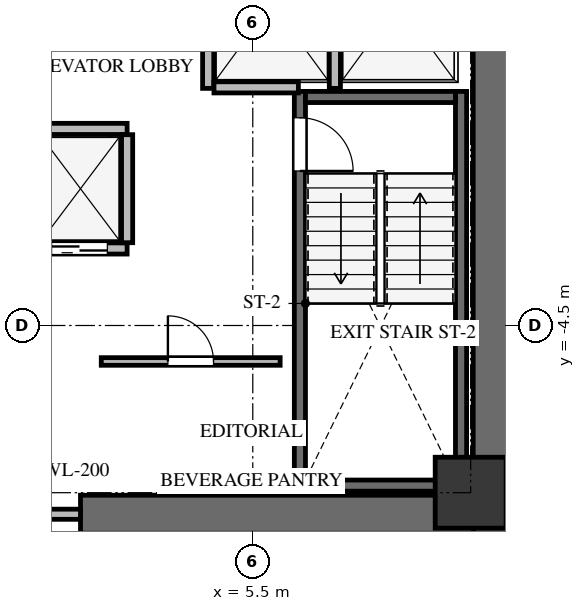
"""IFC4 building model, lengths in metres.
Left out: names, types, materials, properties, quantities, classifications, styles, units other than length and angle.
Written with IfcOpenShell. Run it as: python <this file> out.ifc"""

import sys

from ifc_helpers import new_model, si_unit, direction, frame, frame_2d, origin, origin_2d, place, context, subcontext, project, spatial, rectangle, extrude, source, transform, mapped, element, fill, save


model = new_model("IFC4")
c1 = context("Model", 3, precision=1e-05, world=origin(), true_north=direction((0.0, 1.0)))
c2 = subcontext(c1, "Body", "Model", "MODEL_VIEW")
j1 = project(units=[si_unit("LENGTHUNIT", "METRE"), si_unit("PLANEANGLEUNIT", "RADIAN")], contexts=[c1])
p1 = place(None, origin())
s1 = spatial("IfcSite", under=j1, at=p1, CompositionType="ELEMENT")
p2 = place(p1, origin())
s2 = spatial("IfcBuilding", under=s1, at=p2, CompositionType="ELEMENT")
p3 = place(p2, frame((0.0, 0.0, 117.3)))
s3 = spatial("IfcBuildingStorey", under=s2, at=p3, CompositionType="ELEMENT", Elevation=117.3)
p4 = place(p3, frame((10.225, -8.6, 0.0), z_axis=(0.0, 0.0, 1.0), x_axis=(0.0, 1.0, 0.0)))
e1 = element("IfcWall", 1, at=p4, inside=s3, PredefinedType="SHEAR", context=c2, shape_type="SweptSolid", body=[
    extrude(rectangle(XDim=17.2, YDim=0.75, at=frame_2d((8.6, 0.0))), origin(), (0.0, 0.0, 1.0), 3.3),
])
p5 = place(p3, frame((2.1, -8.225, 0.0), z_axis=(0.0, 0.0, 1.0), x_axis=(1.0, 0.0, 0.0)))
e2 = element("IfcWall", 2, at=p5, inside=s3, PredefinedType="SHEAR", context=c2, shape_type="SweptSolid", body=[
    extrude(rectangle(XDim=7.75, YDim=0.75, at=frame_2d((3.875, 0.0))), origin(), (0.0, 0.0, 1.0), 3.3),
])
p6 = place(p3, frame((9.61, -7.77, -0.24), z_axis=(0.0, 0.0, 1.0), x_axis=(0.0, 1.0, 0.0)))
e3 = element("IfcWall", 3, at=p6, inside=s3, PredefinedType="SHEAR", context=c2, shape_type="SweptSolid", body=[
    extrude(rectangle(XDim=7.89, YDim=0.22, at=frame_2d((3.945, 0.0))), origin(), (0.0, 0.0, 1.0), 3.3),
])
p7 = place(p3, frame((6.43, 0.12, -0.24), z_axis=(0.0, 0.0, 1.0), x_axis=(0.0, -1.0, 0.0)))
e4 = element("IfcWall", 4, at=p7, inside=s3, PredefinedType="SHEAR", context=c2, shape_type="SweptSolid", body=[
    extrude(rectangle(XDim=7.89, YDim=0.22, at=frame_2d((3.945, 0.0))), origin(), (0.0, 0.0, 1.0), 3.3),
])
p8 = place(p7, frame((0.52, 0.0, 0.0)))
e5 = element("IfcOpeningElement", 5, at=p8, cuts=e4, PredefinedType="OPENING", context=c2, shape_type="SweptSolid", body=[
    extrude(rectangle(XDim=1.05, YDim=2.15, at=frame_2d((0.525, 1.075))), frame((0.0, 0.12, 0.0), z_axis=(0.0, -1.0, 0.0), x_axis=(1.0, 0.0, 0.0)), (0.0, 0.0, 1.0), 0.24),
])
for number, where, z_axis, x_axis in (
    (6, (6.54, -7.66, -0.24), (0.0, 0.0, 1.0), (1.0, 0.0, 0.0)),
    (7, (9.5, 0.01, -0.24), (0.0, 0.0, 1.0), (-1.0, 0.0, 0.0)),
):
    element("IfcWall", number, at=place(p3, frame(where, z_axis=z_axis, x_axis=x_axis)), inside=s3, PredefinedType="SHEAR", context=c2, shape_type="SweptSolid", body=[
        extrude(rectangle(XDim=2.96, YDim=0.22, at=frame_2d((1.48, 0.0))), origin(), (0.0, 0.0, 1.0), 3.3),
    ])
m1 = source(origin(), c2, "Body", "SweptSolid", [
    extrude(rectangle(XDim=1.4, YDim=1.4, at=origin_2d()), origin(), (0.0, 0.0, 1.0), 3.3),
])
p9 = place(p3, frame((9.8, -7.8, -0.24), z_axis=(0.0, 0.0, 1.0), x_axis=(1.0, 0.0, 0.0)))
e8 = element("IfcColumn", 8, at=p9, inside=s3, PredefinedType="COLUMN", context=c2, shape_type="MappedRepresentation", body=[
    mapped(m1, transform((0.0, 0.0, 0.0), x_axis=(1.0, 0.0, 0.0), y_axis=(0.0, 1.0, 0.0), z_axis=(0.0, 0.0, 1.0), scale=1.0)),
])
p10 = place(p3, frame((-2.1, -8.225, 0.0), z_axis=(0.0, 0.0, 1.0), x_axis=(1.0, 0.0, 0.0)))
e9 = element("IfcWall", 9, at=p10, inside=s3, PredefinedType="SOLIDWALL", context=c2, shape_type="SweptSolid", body=[
    extrude(rectangle(XDim=4.2, YDim=0.2, at=frame_2d((2.1, 0.0))), origin(), (0.0, 0.0, 1.0), 3.045),
])
p11 = place(p10, frame((1.2, 0.0, 0.0)))
e10 = element("IfcOpeningElement", 10, at=p11, cuts=e9, PredefinedType="OPENING", context=c2, shape_type="SweptSolid", body=[
    extrude(rectangle(XDim=1.8, YDim=2.15, at=frame_2d((0.9, 1.075))), frame((0.0, 0.11, 0.0), z_axis=(0.0, -1.0, 0.0), x_axis=(1.0, 0.0, 0.0)), (0.0, 0.0, 1.0), 0.22),
])
for number, where, z_axis, x_axis in (
    (11, (4.62, 0.18, 0.0), (0.0, 0.0, 1.0), (0.0, 1.0, 0.0)),
    (12, (7.12, 0.18, 0.0), (0.0, 0.0, 1.0), (0.0, 1.0, 0.0)),
):
    element("IfcWall", number, at=place(p3, frame(where, z_axis=z_axis, x_axis=x_axis)), inside=s3, PredefinedType="SOLIDWALL", context=c2, shape_type="SweptSolid", body=[
        extrude(rectangle(XDim=3.186, YDim=0.22, at=frame_2d((1.593, 0.0))), origin(), (0.0, 0.0, 1.0), 3.045),
    ])
p12 = place(p3, frame((4.734, 0.2, 0.0), z_axis=(0.0, 0.0, 1.0), x_axis=(1.0, 0.0, 0.0)))
e13 = element("IfcWall", 13, at=p12, inside=s3, PredefinedType="SOLIDWALL", context=c2, shape_type="SweptSolid", body=[
    extrude(rectangle(XDim=1.666, YDim=0.22, at=frame_2d((0.833, 0.0))), origin(), (0.0, 0.0, 1.0), 3.045),
])
p13 = place(p3, frame((-4.22, -2.98, 0.0), z_axis=(0.0, 0.0, 1.0), x_axis=(1.0, 0.0, 0.0)))
e14 = element("IfcWall", 14, at=p13, inside=s3, PredefinedType="SOLIDWALL", context=c2, shape_type="SweptSolid", body=[
    extrude(rectangle(XDim=7.24, YDim=0.22, at=frame_2d((3.62, 0.0))), origin(), (0.0, 0.0, 1.0), 3.045),
])
p14 = place(p13, frame((0.35, 0.0, 0.0)))
e15 = element("IfcOpeningElement", 15, at=p14, cuts=e14, PredefinedType="OPENING", context=c2, shape_type="SweptSolid", body=[
    extrude(rectangle(XDim=1.1, YDim=2.15, at=frame_2d((0.55, 1.075))), frame((0.0, 0.12, 0.0), z_axis=(0.0, -1.0, 0.0), x_axis=(1.0, 0.0, 0.0)), (0.0, 0.0, 1.0), 0.24),
])
p15 = place(p13, frame((2.15, 0.0, 0.0)))
e16 = element("IfcOpeningElement", 16, at=p15, cuts=e14, PredefinedType="OPENING", context=c2, shape_type="SweptSolid", body=[
    extrude(rectangle(XDim=1.1, YDim=2.15, at=frame_2d((0.55, 1.075))), frame((0.0, 0.12, 0.0), z_axis=(0.0, -1.0, 0.0), x_axis=(1.0, 0.0, 0.0)), (0.0, 0.0, 1.0), 0.24),
])
p16 = place(p13, frame((3.95, 0.0, 0.0)))
e17 = element("IfcOpeningElement", 17, at=p16, cuts=e14, PredefinedType="OPENING", context=c2, shape_type="SweptSolid", body=[
    extrude(rectangle(XDim=1.1, YDim=2.15, at=frame_2d((0.55, 1.075))), frame((0.0, 0.12, 0.0), z_axis=(0.0, -1.0, 0.0), x_axis=(1.0, 0.0, 0.0)), (0.0, 0.0, 1.0), 0.24),
])
p17 = place(p13, frame((5.75, 0.0, 0.0)))
e18 = element("IfcOpeningElement", 18, at=p17, cuts=e14, PredefinedType="OPENING", context=c2, shape_type="SweptSolid", body=[
    extrude(rectangle(XDim=1.1, YDim=2.15, at=frame_2d((0.55, 1.075))), frame((0.0, 0.12, 0.0), z_axis=(0.0, -1.0, 0.0), x_axis=(1.0, 0.0, 0.0)), (0.0, 0.0, 1.0), 0.24),
])
p18 = place(p3, frame((-4.22, -0.62, 0.0), z_axis=(0.0, 0.0, 1.0), x_axis=(1.0, 0.0, 0.0)))
e19 = element("IfcWall", 19, at=p18, inside=s3, PredefinedType="SOLIDWALL", context=c2, shape_type="SweptSolid", body=[
    extrude(rectangle(XDim=7.24, YDim=0.22, at=frame_2d((3.62, 0.0))), origin(), (0.0, 0.0, 1.0), 3.045),
])
p19 = place(p3, frame((3.02, -2.866, 0.0), z_axis=(0.0, 0.0, 1.0), x_axis=(0.0, 1.0, 0.0)))
e20 = element("IfcWall", 20, at=p19, inside=s3, PredefinedType="SOLIDWALL", context=c2, shape_type="SweptSolid", body=[
    extrude(rectangle(XDim=2.132, YDim=0.22, at=frame_2d((1.066, 0.0))), origin(), (0.0, 0.0, 1.0), 3.045),
])
p20 = place(p3, frame((2.51, -5.21, 0.0), z_axis=(0.0, 0.0, 1.0), x_axis=(1.0, 0.0, 0.0)))
e21 = element("IfcWall", 21, at=p20, inside=s3, PredefinedType="PARTITIONING", context=c2, shape_type="SweptSolid", body=[
    extrude(rectangle(XDim=3.53, YDim=0.15, at=frame_2d((1.765, 0.0))), origin(), (0.0, 0.0, 1.0), 3.045),
])
p21 = place(p20, frame((1.315, 0.0, 0.0)))
e22 = element("IfcOpeningElement", 22, at=p21, cuts=e21, PredefinedType="OPENING", context=c2, shape_type="SweptSolid", body=[
    extrude(rectangle(XDim=0.9, YDim=2.05, at=frame_2d((0.45, 1.025))), frame((0.0, 0.085, 0.0), z_axis=(0.0, -1.0, 0.0), x_axis=(1.0, 0.0, 0.0)), (0.0, 0.0, 1.0), 0.17),
])
m2 = source(origin(), c2, "Body", "SweptSolid", [
    extrude(rectangle(XDim=1.05, YDim=2.15, at=frame_2d((0.525, 1.075))), frame((0.0, 0.025, 0.0), z_axis=(0.0, -1.0, 0.0), x_axis=(1.0, 0.0, 0.0)), (0.0, 0.0, 1.0), 0.05),
])
p22 = place(p8, origin())
e23 = element("IfcDoor", 23, at=p22, inside=s3, OperationType="SINGLE_SWING_RIGHT", PredefinedType="DOOR", context=c2, shape_type="MappedRepresentation", body=[
    mapped(m2, transform((0.0, 0.0, 0.0), x_axis=(1.0, 0.0, 0.0), y_axis=(0.0, 1.0, 0.0), z_axis=(0.0, 0.0, 1.0), scale=1.0)),
])
fill(e5, e23)
m3 = source(origin(), c2, "Body", "SweptSolid", [
    extrude(rectangle(XDim=1.1, YDim=2.15, at=frame_2d((0.55, 1.075))), frame((0.0, 0.025, 0.0), z_axis=(0.0, -1.0, 0.0), x_axis=(1.0, 0.0, 0.0)), (0.0, 0.0, 1.0), 0.05),
])
p23 = place(p17, origin())
e24 = element("IfcDoor", 24, at=p23, inside=s3, OperationType="DOUBLE_DOOR_SLIDING", PredefinedType="DOOR", context=c2, shape_type="MappedRepresentation", body=[
    mapped(m3, transform((0.0, 0.0, 0.0), x_axis=(1.0, 0.0, 0.0), y_axis=(0.0, 1.0, 0.0), z_axis=(0.0, 0.0, 1.0), scale=1.0)),
])
fill(e18, e24)
m4 = source(origin(), c2, "Body", "SweptSolid", [
    extrude(rectangle(XDim=0.9, YDim=2.05, at=frame_2d((0.45, 1.025))), frame((0.0, 0.025, 0.0), z_axis=(0.0, -1.0, 0.0), x_axis=(1.0, 0.0, 0.0)), (0.0, 0.0, 1.0), 0.05),
])
p24 = place(p21, origin())
e25 = element("IfcDoor", 25, at=p24, inside=s3, OperationType="SINGLE_SWING_LEFT", PredefinedType="DOOR", context=c2, shape_type="MappedRepresentation", body=[
    mapped(m4, transform((0.0, 0.0, 0.0), x_axis=(1.0, 0.0, 0.0), y_axis=(0.0, 1.0, 0.0), z_axis=(0.0, 0.0, 1.0), scale=1.0)),
])
fill(e22, e25)
save(model, sys.argv[1])
